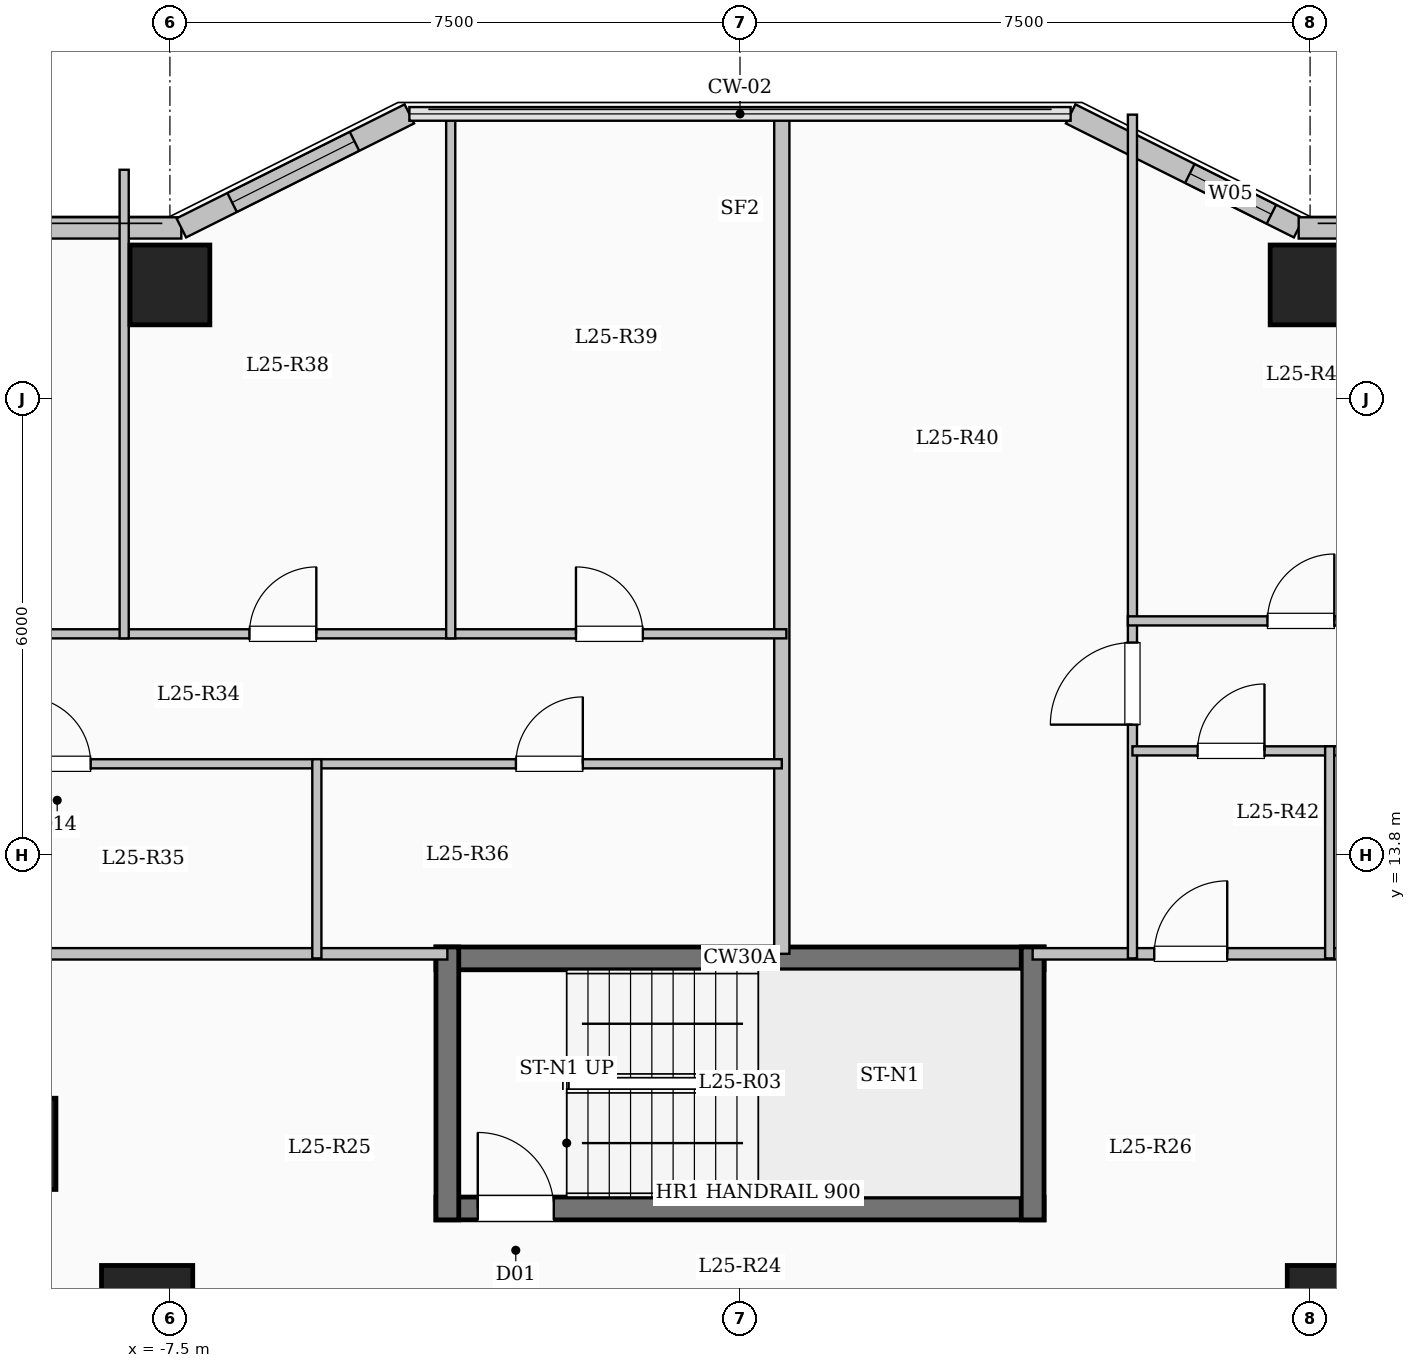
"""IFC4 building model, lengths in metres.
Left out: names, types, materials, properties, quantities, classifications, styles, units other than length and angle.
Written with IfcOpenShell. Run it as: python <this file> out.ifc"""

import sys

from ifc_helpers import new_model, si_unit, direction, frame, frame_2d, origin, origin_2d, place, context, subcontext, project, spatial, rectangle, extrude, element, fill, save


model = new_model("IFC4")
c1 = context("Model", 3, precision=1e-05, world=origin(), true_north=direction((0.0, 1.0)))
c2 = subcontext(c1, "Body", "Model", "MODEL_VIEW")
j1 = project(units=[si_unit("LENGTHUNIT", "METRE"), si_unit("PLANEANGLEUNIT", "RADIAN")], contexts=[c1])
p1 = place(None, origin())
s1 = spatial("IfcSite", under=j1, at=p1, CompositionType="ELEMENT")
p2 = place(p1, origin())
s2 = spatial("IfcBuilding", under=s1, at=p2, CompositionType="ELEMENT")
p3 = place(p2, frame((0.0, 0.0, 95.05)))
s3 = spatial("IfcBuildingStorey", under=s2, at=p3, CompositionType="ELEMENT", Elevation=95.05)
for number, where, z_axis, x_axis in (
    (1, (-7.8, 7.8, 0.0), (0.0, 0.0, 1.0), (1.0, 0.0, 0.0)),
    (2, (7.8, 7.8, 0.0), (0.0, 0.0, 1.0), (1.0, 0.0, 0.0)),
    (3, (-9.6, 10.0, 0.0), (0.0, 0.0, 1.0), (1.0, 0.0, 0.0)),
):
    element("IfcColumn", number, at=place(p3, frame(where, z_axis=z_axis, x_axis=x_axis)), inside=s3, PredefinedType="COLUMN", context=c2, shape_type="SweptSolid", body=[
        extrude(rectangle(XDim=1.2, YDim=1.2, at=origin_2d()), origin(), (0.0, 0.0, 1.0), 3.35),
    ])
for number, where, z_axis, x_axis in (
    (4, (-7.5, 21.3, 0.0), (0.0, 0.0, 1.0), (1.0, 0.0, 0.0)),
    (5, (7.5, 21.3, 0.0), (0.0, 0.0, 1.0), (1.0, 0.0, 0.0)),
):
    element("IfcColumn", number, at=place(p3, frame(where, z_axis=z_axis, x_axis=x_axis)), inside=s3, PredefinedType="COLUMN", context=c2, shape_type="SweptSolid", body=[
        extrude(rectangle(XDim=1.05, YDim=1.05, at=origin_2d()), origin(), (0.0, 0.0, 1.0), 3.35),
    ])
p4 = place(p3, frame((-21.15, 22.05, 0.0), z_axis=(0.0, 0.0, 1.0), x_axis=(1.0, 0.0, 0.0)))
e6 = element("IfcWall", 6, at=p4, inside=s3, PredefinedType="SOLIDWALL", context=c2, shape_type="SweptSolid", body=[
    extrude(rectangle(XDim=13.8, YDim=0.28, at=frame_2d((6.9, 0.0))), origin(), (0.0, 0.0, 1.0), 3.1),
])
p5 = place(p4, frame((3.216, 0.0, 0.9)))
e7 = element("IfcOpeningElement", 7, at=p5, cuts=e6, PredefinedType="OPENING", context=c2, shape_type="SweptSolid", body=[
    extrude(rectangle(XDim=2.4, YDim=1.8, at=frame_2d((1.2, 0.9))), frame((0.0, 0.15, 0.0), z_axis=(0.0, -1.0, 0.0), x_axis=(1.0, 0.0, 0.0)), (0.0, 0.0, 1.0), 0.3),
])
p6 = place(p4, frame((10.014, 0.0, 0.9)))
e8 = element("IfcOpeningElement", 8, at=p6, cuts=e6, PredefinedType="OPENING", context=c2, shape_type="SweptSolid", body=[
    extrude(rectangle(XDim=1.8, YDim=1.65, at=frame_2d((0.9, 0.825))), frame((0.0, 0.15, 0.0), z_axis=(0.0, -1.0, 0.0), x_axis=(1.0, 0.0, 0.0)), (0.0, 0.0, 1.0), 0.3),
])
p7 = place(p3, frame((-7.35, 22.05, 0.0), z_axis=(0.0, 0.0, 1.0), x_axis=(0.894427191, 0.4472135955, 0.0)))
e9 = element("IfcWall", 9, at=p7, inside=s3, PredefinedType="SOLIDWALL", context=c2, shape_type="SweptSolid", body=[
    extrude(rectangle(XDim=3.354, YDim=0.28, at=frame_2d((1.677, 0.0))), origin(), (0.0, 0.0, 1.0), 3.1),
])
p8 = place(p7, frame((0.747, 0.0, 0.9)))
e10 = element("IfcOpeningElement", 10, at=p8, cuts=e9, PredefinedType="OPENING", context=c2, shape_type="SweptSolid", body=[
    extrude(rectangle(XDim=1.8, YDim=1.65, at=frame_2d((0.9, 0.825))), frame((0.0, 0.15, 0.0), z_axis=(0.0, -1.0, 0.0), x_axis=(1.0, 0.0, 0.0)), (0.0, 0.0, 1.0), 0.3),
])
p9 = place(p3, frame((4.35, 23.55, 0.0), z_axis=(0.0, 0.0, 1.0), x_axis=(0.894427191, -0.4472135955, 0.0)))
e11 = element("IfcWall", 11, at=p9, inside=s3, PredefinedType="SOLIDWALL", context=c2, shape_type="SweptSolid", body=[
    extrude(rectangle(XDim=3.354, YDim=0.28, at=frame_2d((1.677, 0.0))), origin(), (0.0, 0.0, 1.0), 3.1),
])
p10 = place(p9, frame((1.753, 0.0, 0.95)))
e12 = element("IfcOpeningElement", 12, at=p10, cuts=e11, PredefinedType="OPENING", context=c2, shape_type="SweptSolid", body=[
    extrude(rectangle(XDim=1.2, YDim=1.5, at=frame_2d((0.6, 0.75))), frame((0.0, 0.15, 0.0), z_axis=(0.0, -1.0, 0.0), x_axis=(1.0, 0.0, 0.0)), (0.0, 0.0, 1.0), 0.3),
])
p11 = place(p3, frame((7.35, 22.05, 0.0), z_axis=(0.0, 0.0, 1.0), x_axis=(1.0, 0.0, 0.0)))
e13 = element("IfcWall", 13, at=p11, inside=s3, PredefinedType="SOLIDWALL", context=c2, shape_type="SweptSolid", body=[
    extrude(rectangle(XDim=13.8, YDim=0.28, at=frame_2d((6.9, 0.0))), origin(), (0.0, 0.0, 1.0), 3.1),
])
p12 = place(p11, frame((0.554, 0.0, 0.95)))
e14 = element("IfcOpeningElement", 14, at=p12, cuts=e13, PredefinedType="OPENING", context=c2, shape_type="SweptSolid", body=[
    extrude(rectangle(XDim=1.2, YDim=1.5, at=frame_2d((0.6, 0.75))), frame((0.0, 0.15, 0.0), z_axis=(0.0, -1.0, 0.0), x_axis=(1.0, 0.0, 0.0)), (0.0, 0.0, 1.0), 0.3),
])
p13 = place(p11, frame((4.044, 0.0, 0.9)))
e15 = element("IfcOpeningElement", 15, at=p13, cuts=e13, PredefinedType="OPENING", context=c2, shape_type="SweptSolid", body=[
    extrude(rectangle(XDim=2.4, YDim=1.8, at=frame_2d((1.2, 0.9))), frame((0.0, 0.15, 0.0), z_axis=(0.0, -1.0, 0.0), x_axis=(1.0, 0.0, 0.0)), (0.0, 0.0, 1.0), 0.3),
])
p14 = place(p11, frame((9.99, 0.0, 0.9)))
e16 = element("IfcOpeningElement", 16, at=p14, cuts=e13, PredefinedType="OPENING", context=c2, shape_type="SweptSolid", body=[
    extrude(rectangle(XDim=1.8, YDim=1.65, at=frame_2d((0.9, 0.825))), frame((0.0, 0.15, 0.0), z_axis=(0.0, -1.0, 0.0), x_axis=(1.0, 0.0, 0.0)), (0.0, 0.0, 1.0), 0.3),
])
p15 = place(p3, frame((-4.0, 12.44, 0.0), z_axis=(0.0, 0.0, 1.0), x_axis=(1.0, 0.0, 0.0)))
e17 = element("IfcWall", 17, at=p15, inside=s3, PredefinedType="SHEAR", context=c2, shape_type="SweptSolid", body=[
    extrude(rectangle(XDim=8.0, YDim=0.3, at=frame_2d((4.0, 0.0))), origin(), (0.0, 0.0, 1.0), 3.35),
])
p16 = place(p3, frame((-4.0, 9.15, 0.0), z_axis=(0.0, 0.0, 1.0), x_axis=(1.0, 0.0, 0.0)))
e18 = element("IfcWall", 18, at=p16, inside=s3, PredefinedType="SHEAR", context=c2, shape_type="SweptSolid", body=[
    extrude(rectangle(XDim=8.0, YDim=0.3, at=frame_2d((4.0, 0.0))), origin(), (0.0, 0.0, 1.0), 3.35),
])
p17 = place(p16, frame((0.55, 0.0, 0.0)))
e19 = element("IfcOpeningElement", 19, at=p17, cuts=e18, PredefinedType="OPENING", context=c2, shape_type="SweptSolid", body=[
    extrude(rectangle(XDim=1.0, YDim=2.15, at=frame_2d((0.5, 1.075))), frame((0.0, 0.16, 0.0), z_axis=(0.0, -1.0, 0.0), x_axis=(1.0, 0.0, 0.0)), (0.0, 0.0, 1.0), 0.32),
])
for number, where, z_axis, x_axis in (
    (20, (-3.85, 9.0, 0.0), (0.0, 0.0, 1.0), (0.0, 1.0, 0.0)),
    (21, (3.85, 9.0, 0.0), (0.0, 0.0, 1.0), (0.0, 1.0, 0.0)),
):
    element("IfcWall", number, at=place(p3, frame(where, z_axis=z_axis, x_axis=x_axis)), inside=s3, PredefinedType="SHEAR", context=c2, shape_type="SweptSolid", body=[
        extrude(rectangle(XDim=3.59, YDim=0.3, at=frame_2d((1.795, 0.0))), origin(), (0.0, 0.0, 1.0), 3.35),
    ])
p18 = place(p3, frame((-21.05, 12.5, 0.0), z_axis=(0.0, 0.0, 1.0), x_axis=(1.0, 0.0, 0.0)))
e22 = element("IfcWall", 22, at=p18, inside=s3, PredefinedType="PARTITIONING", context=c2, shape_type="SweptSolid", body=[
    extrude(rectangle(XDim=17.2, YDim=0.15, at=frame_2d((8.6, 0.0))), origin(), (0.0, 0.0, 1.0), 3.1),
])
p19 = place(p18, frame((0.7, 0.0, 0.0)))
e23 = element("IfcOpeningElement", 23, at=p19, cuts=e22, PredefinedType="OPENING", context=c2, shape_type="SweptSolid", body=[
    extrude(rectangle(XDim=0.96, YDim=2.15, at=frame_2d((0.48, 1.075))), frame((0.0, 0.085, 0.0), z_axis=(0.0, -1.0, 0.0), x_axis=(1.0, 0.0, 0.0)), (0.0, 0.0, 1.0), 0.17),
])
p20 = place(p3, frame((3.85, 12.5, 0.0), z_axis=(0.0, 0.0, 1.0), x_axis=(1.0, 0.0, 0.0)))
e24 = element("IfcWall", 24, at=p20, inside=s3, PredefinedType="PARTITIONING", context=c2, shape_type="SweptSolid", body=[
    extrude(rectangle(XDim=17.2, YDim=0.15, at=frame_2d((8.6, 0.0))), origin(), (0.0, 0.0, 1.0), 3.1),
])
p21 = place(p20, frame((1.6, 0.0, 0.0)))
e25 = element("IfcOpeningElement", 25, at=p21, cuts=e24, PredefinedType="OPENING", context=c2, shape_type="SweptSolid", body=[
    extrude(rectangle(XDim=0.96, YDim=2.15, at=frame_2d((0.48, 1.075))), frame((0.0, 0.085, 0.0), z_axis=(0.0, -1.0, 0.0), x_axis=(1.0, 0.0, 0.0)), (0.0, 0.0, 1.0), 0.17),
])
p22 = place(p20, frame((6.625, 0.0, 0.0)))
e26 = element("IfcOpeningElement", 26, at=p22, cuts=e24, PredefinedType="OPENING", context=c2, shape_type="SweptSolid", body=[
    extrude(rectangle(XDim=0.96, YDim=2.15, at=frame_2d((0.48, 1.075))), frame((0.0, 0.085, 0.0), z_axis=(0.0, -1.0, 0.0), x_axis=(1.0, 0.0, 0.0)), (0.0, 0.0, 1.0), 0.17),
])
p23 = place(p3, frame((0.55, 12.5, 0.0), z_axis=(0.0, 0.0, 1.0), x_axis=(0.0, 1.0, 0.0)))
e27 = element("IfcWall", 27, at=p23, inside=s3, PredefinedType="SOLIDWALL", context=c2, shape_type="SweptSolid", body=[
    extrude(rectangle(XDim=11.08, YDim=0.2, at=frame_2d((5.54, 0.0))), origin(), (0.0, 0.0, 1.0), 3.1),
])
p24 = place(p3, frame((-12.398, 15.0, 0.0), z_axis=(0.0, 0.0, 1.0), x_axis=(1.0, 0.0, 0.0)))
e28 = element("IfcWall", 28, at=p24, inside=s3, PredefinedType="PARTITIONING", context=c2, shape_type="SweptSolid", body=[
    extrude(rectangle(XDim=6.831, YDim=0.12, at=frame_2d((3.416, 0.0))), origin(), (0.0, 0.0, 1.0), 3.1),
])
p25 = place(p24, frame((2.975, 0.0, 0.0)))
e29 = element("IfcOpeningElement", 29, at=p25, cuts=e28, PredefinedType="OPENING", context=c2, shape_type="SweptSolid", body=[
    extrude(rectangle(XDim=0.88, YDim=2.1, at=frame_2d((0.44, 1.05))), frame((0.0, 0.07, 0.0), z_axis=(0.0, -1.0, 0.0), x_axis=(1.0, 0.0, 0.0)), (0.0, 0.0, 1.0), 0.14),
])
p26 = place(p3, frame((-5.567, 15.0, 0.0), z_axis=(0.0, 0.0, 1.0), x_axis=(1.0, 0.0, 0.0)))
e30 = element("IfcWall", 30, at=p26, inside=s3, PredefinedType="PARTITIONING", context=c2, shape_type="SweptSolid", body=[
    extrude(rectangle(XDim=6.117, YDim=0.12, at=frame_2d((3.059, 0.0))), origin(), (0.0, 0.0, 1.0), 3.1),
])
p27 = place(p26, frame((2.619, 0.0, 0.0)))
e31 = element("IfcOpeningElement", 31, at=p27, cuts=e30, PredefinedType="OPENING", context=c2, shape_type="SweptSolid", body=[
    extrude(rectangle(XDim=0.88, YDim=2.1, at=frame_2d((0.44, 1.05))), frame((0.0, 0.07, 0.0), z_axis=(0.0, -1.0, 0.0), x_axis=(1.0, 0.0, 0.0)), (0.0, 0.0, 1.0), 0.14),
])
p28 = place(p3, frame((-12.458, 16.71, 0.0), z_axis=(0.0, 0.0, 1.0), x_axis=(1.0, 0.0, 0.0)))
e32 = element("IfcWall", 32, at=p28, inside=s3, PredefinedType="PARTITIONING", context=c2, shape_type="SweptSolid", body=[
    extrude(rectangle(XDim=13.068, YDim=0.12, at=frame_2d((6.534, 0.0))), origin(), (0.0, 0.0, 1.0), 3.1),
])
p29 = place(p28, frame((1.708, 0.0, 0.0)))
e33 = element("IfcOpeningElement", 33, at=p29, cuts=e32, PredefinedType="OPENING", context=c2, shape_type="SweptSolid", body=[
    extrude(rectangle(XDim=0.88, YDim=2.1, at=frame_2d((0.44, 1.05))), frame((0.0, 0.07, 0.0), z_axis=(0.0, -1.0, 0.0), x_axis=(1.0, 0.0, 0.0)), (0.0, 0.0, 1.0), 0.14),
])
p30 = place(p28, frame((6.004, 0.0, 0.0)))
e34 = element("IfcOpeningElement", 34, at=p30, cuts=e32, PredefinedType="OPENING", context=c2, shape_type="SweptSolid", body=[
    extrude(rectangle(XDim=0.88, YDim=2.1, at=frame_2d((0.44, 1.05))), frame((0.0, 0.07, 0.0), z_axis=(0.0, -1.0, 0.0), x_axis=(1.0, 0.0, 0.0)), (0.0, 0.0, 1.0), 0.14),
])
p31 = place(p28, frame((10.3, 0.0, 0.0)))
e35 = element("IfcOpeningElement", 35, at=p31, cuts=e32, PredefinedType="OPENING", context=c2, shape_type="SweptSolid", body=[
    extrude(rectangle(XDim=0.88, YDim=2.1, at=frame_2d((0.44, 1.05))), frame((0.0, 0.07, 0.0), z_axis=(0.0, -1.0, 0.0), x_axis=(1.0, 0.0, 0.0)), (0.0, 0.0, 1.0), 0.14),
])
p32 = place(p3, frame((-5.567, 12.44, 0.0), z_axis=(0.0, 0.0, 1.0), x_axis=(0.0, 1.0, 0.0)))
e36 = element("IfcWall", 36, at=p32, inside=s3, PredefinedType="PARTITIONING", context=c2, shape_type="SweptSolid", body=[
    extrude(rectangle(XDim=2.62, YDim=0.12, at=frame_2d((1.31, 0.0))), origin(), (0.0, 0.0, 1.0), 3.1),
])
p33 = place(p3, frame((-8.102, 16.65, 0.0), z_axis=(0.0, 0.0, 1.0), x_axis=(0.0, 1.0, 0.0)))
e37 = element("IfcWall", 37, at=p33, inside=s3, PredefinedType="PARTITIONING", context=c2, shape_type="SweptSolid", body=[
    extrude(rectangle(XDim=6.165, YDim=0.12, at=frame_2d((3.083, 0.0))), origin(), (0.0, 0.0, 1.0), 2.435),
])
p34 = place(p3, frame((-3.806, 16.65, 0.0), z_axis=(0.0, 0.0, 1.0), x_axis=(0.0, 1.0, 0.0)))
e38 = element("IfcWall", 38, at=p34, inside=s3, PredefinedType="PARTITIONING", context=c2, shape_type="SweptSolid", body=[
    extrude(rectangle(XDim=6.93, YDim=0.12, at=frame_2d((3.465, 0.0))), origin(), (0.0, 0.0, 1.0), 3.1),
])
p35 = place(p3, frame((5.163, 12.44, 0.0), z_axis=(0.0, 0.0, 1.0), x_axis=(0.0, 1.0, 0.0)))
e39 = element("IfcWall", 39, at=p35, inside=s3, PredefinedType="PARTITIONING", context=c2, shape_type="SweptSolid", body=[
    extrude(rectangle(XDim=11.1, YDim=0.12, at=frame_2d((5.55, 0.0))), origin(), (0.0, 0.0, 1.0), 3.1),
])
p36 = place(p35, frame((3.075, 0.0, 0.0)))
e40 = element("IfcOpeningElement", 40, at=p36, cuts=e39, PredefinedType="OPENING", context=c2, shape_type="SweptSolid", body=[
    extrude(rectangle(XDim=1.08, YDim=2.15, at=frame_2d((0.54, 1.075))), frame((0.0, 0.07, 0.0), z_axis=(0.0, -1.0, 0.0), x_axis=(1.0, 0.0, 0.0)), (0.0, 0.0, 1.0), 0.14),
])
p37 = place(p3, frame((5.163, 15.17, 0.0), z_axis=(0.0, 0.0, 1.0), x_axis=(1.0, 0.0, 0.0)))
e41 = element("IfcWall", 41, at=p37, inside=s3, PredefinedType="PARTITIONING", context=c2, shape_type="SweptSolid", body=[
    extrude(rectangle(XDim=2.595, YDim=0.12, at=frame_2d((1.297, 0.0))), origin(), (0.0, 0.0, 1.0), 3.1),
])
p38 = place(p37, frame((0.857, 0.0, 0.0)))
e42 = element("IfcOpeningElement", 42, at=p38, cuts=e41, PredefinedType="OPENING", context=c2, shape_type="SweptSolid", body=[
    extrude(rectangle(XDim=0.88, YDim=2.1, at=frame_2d((0.44, 1.05))), frame((0.0, 0.07, 0.0), z_axis=(0.0, -1.0, 0.0), x_axis=(1.0, 0.0, 0.0)), (0.0, 0.0, 1.0), 0.14),
])
p39 = place(p3, frame((7.758, 15.17, 0.0), z_axis=(0.0, 0.0, 1.0), x_axis=(1.0, 0.0, 0.0)))
e43 = element("IfcWall", 43, at=p39, inside=s3, PredefinedType="PARTITIONING", context=c2, shape_type="SweptSolid", body=[
    extrude(rectangle(XDim=2.017, YDim=0.12, at=frame_2d((1.008, 0.0))), origin(), (0.0, 0.0, 1.0), 3.1),
])
p40 = place(p39, frame((0.569, 0.0, 0.0)))
e44 = element("IfcOpeningElement", 44, at=p40, cuts=e43, PredefinedType="OPENING", context=c2, shape_type="SweptSolid", body=[
    extrude(rectangle(XDim=0.88, YDim=2.1, at=frame_2d((0.44, 1.05))), frame((0.0, 0.07, 0.0), z_axis=(0.0, -1.0, 0.0), x_axis=(1.0, 0.0, 0.0)), (0.0, 0.0, 1.0), 0.14),
])
p41 = place(p3, frame((5.103, 16.88, 0.0), z_axis=(0.0, 0.0, 1.0), x_axis=(1.0, 0.0, 0.0)))
e45 = element("IfcWall", 45, at=p41, inside=s3, PredefinedType="PARTITIONING", context=c2, shape_type="SweptSolid", body=[
    extrude(rectangle(XDim=4.732, YDim=0.12, at=frame_2d((2.366, 0.0))), origin(), (0.0, 0.0, 1.0), 3.1),
])
p42 = place(p41, frame((1.836, 0.0, 0.0)))
e46 = element("IfcOpeningElement", 46, at=p42, cuts=e45, PredefinedType="OPENING", context=c2, shape_type="SweptSolid", body=[
    extrude(rectangle(XDim=0.88, YDim=2.1, at=frame_2d((0.44, 1.05))), frame((0.0, 0.07, 0.0), z_axis=(0.0, -1.0, 0.0), x_axis=(1.0, 0.0, 0.0)), (0.0, 0.0, 1.0), 0.14),
])
p43 = place(p3, frame((7.758, 12.44, 0.0), z_axis=(0.0, 0.0, 1.0), x_axis=(0.0, 1.0, 0.0)))
e47 = element("IfcWall", 47, at=p43, inside=s3, PredefinedType="PARTITIONING", context=c2, shape_type="SweptSolid", body=[
    extrude(rectangle(XDim=2.79, YDim=0.12, at=frame_2d((1.395, 0.0))), origin(), (0.0, 0.0, 1.0), 2.435),
])
p44 = place(p8, origin())
e48 = element("IfcWindow", 48, at=p44, inside=s3, PartitioningType="SINGLE_PANEL", PredefinedType="WINDOW", context=c2, shape_type="SweptSolid", body=[
    extrude(rectangle(XDim=1.8, YDim=1.65, at=frame_2d((0.9, 0.825))), frame((0.0, 0.03, 0.0), z_axis=(0.0, -1.0, 0.0), x_axis=(1.0, 0.0, 0.0)), (0.0, 0.0, 1.0), 0.06),
])
fill(e10, e48)
p45 = place(p10, origin())
e49 = element("IfcWindow", 49, at=p45, inside=s3, PartitioningType="SINGLE_PANEL", PredefinedType="WINDOW", context=c2, shape_type="SweptSolid", body=[
    extrude(rectangle(XDim=1.2, YDim=1.5, at=frame_2d((0.6, 0.75))), frame((0.0, 0.03, 0.0), z_axis=(0.0, -1.0, 0.0), x_axis=(1.0, 0.0, 0.0)), (0.0, 0.0, 1.0), 0.06),
])
fill(e12, e49)
p46 = place(p17, origin())
e50 = element("IfcDoor", 50, at=p46, inside=s3, OperationType="SINGLE_SWING_LEFT", PredefinedType="DOOR", context=c2, shape_type="SweptSolid", body=[
    extrude(rectangle(XDim=1.0, YDim=2.15, at=frame_2d((0.5, 1.075))), frame((0.0, 0.025, 0.0), z_axis=(0.0, -1.0, 0.0), x_axis=(1.0, 0.0, 0.0)), (0.0, 0.0, 1.0), 0.05),
])
fill(e19, e50)
p47 = place(p25, origin())
e51 = element("IfcDoor", 51, at=p47, inside=s3, OperationType="SINGLE_SWING_LEFT", PredefinedType="DOOR", context=c2, shape_type="SweptSolid", body=[
    extrude(rectangle(XDim=0.88, YDim=2.1, at=frame_2d((0.44, 1.05))), frame((0.0, 0.025, 0.0), z_axis=(0.0, -1.0, 0.0), x_axis=(1.0, 0.0, 0.0)), (0.0, 0.0, 1.0), 0.05),
])
fill(e29, e51)
p48 = place(p27, origin())
e52 = element("IfcDoor", 52, at=p48, inside=s3, OperationType="SINGLE_SWING_RIGHT", PredefinedType="DOOR", context=c2, shape_type="SweptSolid", body=[
    extrude(rectangle(XDim=0.88, YDim=2.1, at=frame_2d((0.44, 1.05))), frame((0.0, 0.025, 0.0), z_axis=(0.0, -1.0, 0.0), x_axis=(1.0, 0.0, 0.0)), (0.0, 0.0, 1.0), 0.05),
])
fill(e31, e52)
p49 = place(p30, origin())
e53 = element("IfcDoor", 53, at=p49, inside=s3, OperationType="SINGLE_SWING_RIGHT", PredefinedType="DOOR", context=c2, shape_type="SweptSolid", body=[
    extrude(rectangle(XDim=0.88, YDim=2.1, at=frame_2d((0.44, 1.05))), frame((0.0, 0.025, 0.0), z_axis=(0.0, -1.0, 0.0), x_axis=(1.0, 0.0, 0.0)), (0.0, 0.0, 1.0), 0.05),
])
fill(e34, e53)
p50 = place(p31, origin())
e54 = element("IfcDoor", 54, at=p50, inside=s3, OperationType="SINGLE_SWING_LEFT", PredefinedType="DOOR", context=c2, shape_type="SweptSolid", body=[
    extrude(rectangle(XDim=0.88, YDim=2.1, at=frame_2d((0.44, 1.05))), frame((0.0, 0.025, 0.0), z_axis=(0.0, -1.0, 0.0), x_axis=(1.0, 0.0, 0.0)), (0.0, 0.0, 1.0), 0.05),
])
fill(e35, e54)
p51 = place(p21, origin())
e55 = element("IfcDoor", 55, at=p51, inside=s3, OperationType="SINGLE_SWING_RIGHT", PredefinedType="DOOR", context=c2, shape_type="SweptSolid", body=[
    extrude(rectangle(XDim=0.96, YDim=2.15, at=frame_2d((0.48, 1.075))), frame((0.0, 0.025, 0.0), z_axis=(0.0, -1.0, 0.0), x_axis=(1.0, 0.0, 0.0)), (0.0, 0.0, 1.0), 0.05),
])
fill(e25, e55)
p52 = place(p36, origin())
e56 = element("IfcDoor", 56, at=p52, inside=s3, OperationType="SINGLE_SWING_LEFT", PredefinedType="DOOR", context=c2, shape_type="SweptSolid", body=[
    extrude(rectangle(XDim=1.08, YDim=2.15, at=frame_2d((0.54, 1.075))), frame((0.0, 0.025, 0.0), z_axis=(0.0, -1.0, 0.0), x_axis=(1.0, 0.0, 0.0)), (0.0, 0.0, 1.0), 0.05),
])
fill(e40, e56)
p53 = place(p38, origin())
e57 = element("IfcDoor", 57, at=p53, inside=s3, OperationType="SINGLE_SWING_RIGHT", PredefinedType="DOOR", context=c2, shape_type="SweptSolid", body=[
    extrude(rectangle(XDim=0.88, YDim=2.1, at=frame_2d((0.44, 1.05))), frame((0.0, 0.025, 0.0), z_axis=(0.0, -1.0, 0.0), x_axis=(1.0, 0.0, 0.0)), (0.0, 0.0, 1.0), 0.05),
])
fill(e42, e57)
p54 = place(p42, origin())
e58 = element("IfcDoor", 58, at=p54, inside=s3, OperationType="SINGLE_SWING_RIGHT", PredefinedType="DOOR", context=c2, shape_type="SweptSolid", body=[
    extrude(rectangle(XDim=0.88, YDim=2.1, at=frame_2d((0.44, 1.05))), frame((0.0, 0.025, 0.0), z_axis=(0.0, -1.0, 0.0), x_axis=(1.0, 0.0, 0.0)), (0.0, 0.0, 1.0), 0.05),
])
fill(e46, e58)
save(model, sys.argv[1])
